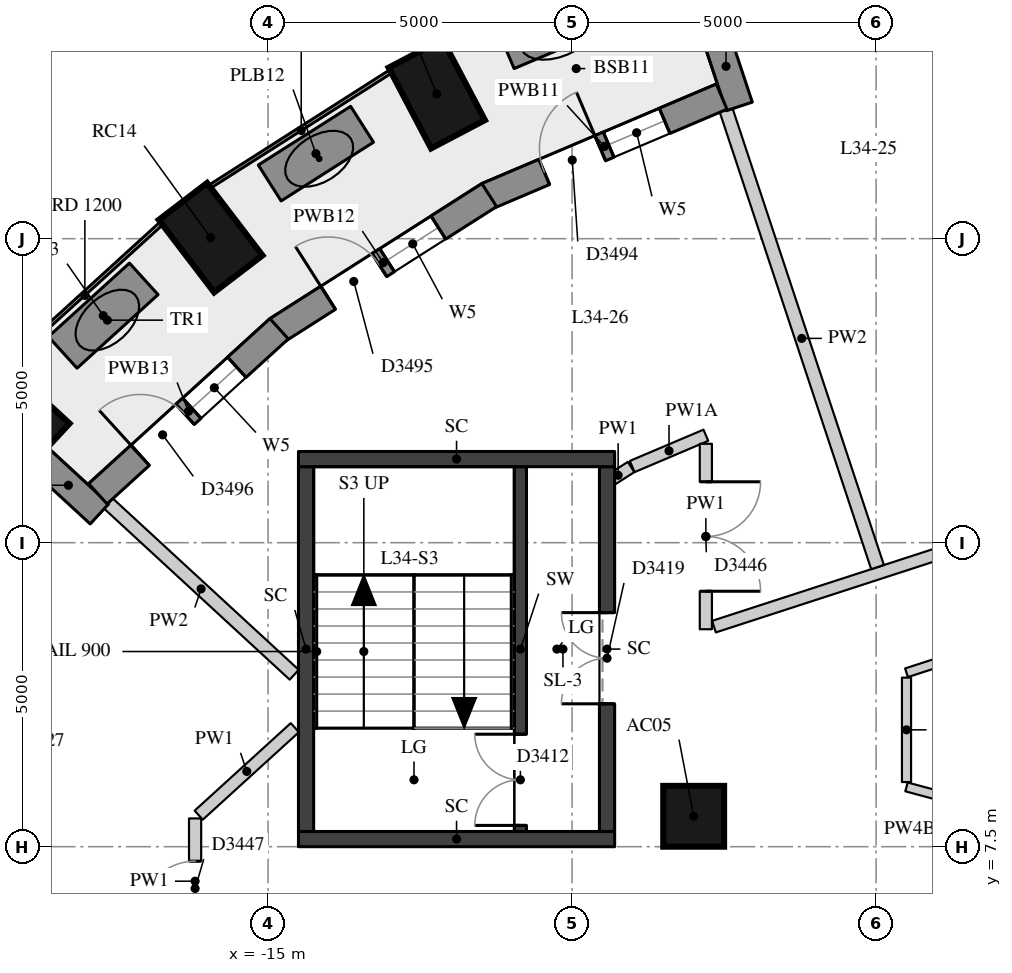
"""IFC4 building model, lengths in metres.
Left out: names, types, materials, properties, quantities, classifications, styles, units other than length and angle.
Written with IfcOpenShell. Run it as: python <this file> out.ifc"""

import sys

from ifc_helpers import new_model, si_unit, direction, frame, frame_2d, origin, origin_2d, place, context, subcontext, project, spatial, rectangle, extrude, element, fill, save


model = new_model("IFC4")
c1 = context("Model", 3, precision=1e-05, world=origin(), true_north=direction((0.0, 1.0)))
c2 = subcontext(c1, "Body", "Model", "MODEL_VIEW")
j1 = project(units=[si_unit("LENGTHUNIT", "METRE"), si_unit("PLANEANGLEUNIT", "RADIAN")], contexts=[c1])
p1 = place(None, origin())
s1 = spatial("IfcSite", under=j1, at=p1, CompositionType="ELEMENT")
p2 = place(p1, origin())
s2 = spatial("IfcBuilding", under=s1, at=p2, CompositionType="ELEMENT")
p3 = place(p2, frame((0.0, 0.0, 121.9)))
s3 = spatial("IfcBuildingStorey", under=s2, at=p3, CompositionType="ELEMENT", Elevation=121.9)
for number, where, z_axis, x_axis in (
    (1, (-12.225, 19.882, 0.0), (0.0, 0.0, 1.0), (-0.465, 0.885, 0.0)),
    (2, (-15.945, 17.517, 0.0), (0.0, 0.0, 1.0), (-0.607, 0.795, 0.0)),
    (3, (-19.156, 14.602, 0.0), (0.0, 0.0, 1.0), (-0.735, 0.678, 0.0)),
):
    element("IfcColumn", number, at=place(p3, frame(where, z_axis=z_axis, x_axis=x_axis)), inside=s3, PredefinedType="COLUMN", context=c2, shape_type="SweptSolid", body=[
        extrude(rectangle(XDim=1.5, YDim=1.0, at=origin_2d()), origin(), (0.0, 0.0, 1.0), 3.3),
    ])
p4 = place(p3, frame((-8.0, 8.0, 0.0), z_axis=(0.0, 0.0, 1.0), x_axis=(1.0, 0.0, 0.0)))
e4 = element("IfcColumn", 4, at=p4, inside=s3, PredefinedType="COLUMN", context=c2, shape_type="SweptSolid", body=[
    extrude(rectangle(XDim=1.0, YDim=1.0, at=origin_2d()), origin(), (0.0, 0.0, 1.0), 3.3),
])
p5 = place(p3, frame((-7.687, 20.995, 0.0), z_axis=(0.0, 0.0, 1.0), x_axis=(0.314541283205, -0.949243794375, 0.0)))
e5 = element("IfcWall", 5, at=p5, inside=s3, PredefinedType="SOLIDWALL", context=c2, shape_type="SweptSolid", body=[
    extrude(rectangle(XDim=1.39, YDim=0.45, at=frame_2d((0.695, 0.0))), origin(), (0.0, 0.0, 1.0), 3.02),
])
p6 = place(p3, frame((-18.795, 13.916, 0.0), z_axis=(0.0, 0.0, 1.0), x_axis=(0.735395448697, -0.677638202905, 0.0)))
e6 = element("IfcWall", 6, at=p6, inside=s3, PredefinedType="SOLIDWALL", context=c2, shape_type="SweptSolid", body=[
    extrude(rectangle(XDim=1.391, YDim=0.45, at=frame_2d((0.695, 0.0))), origin(), (0.0, 0.0, 1.0), 3.02),
])
p7 = place(p3, frame((-7.54, 19.836, 0.0), z_axis=(0.0, 0.0, 1.0), x_axis=(-0.920502375708, -0.390736965637, 0.0)))
e7 = element("IfcWall", 7, at=p7, inside=s3, PredefinedType="SOLIDWALL", context=c2, shape_type="SweptSolid", body=[
    extrude(rectangle(XDim=4.188, YDim=0.45, at=frame_2d((2.094, 0.0))), origin(), (0.0, 0.0, 1.0), 3.02),
])
p8 = place(p7, frame((1.019, 0.0, 0.4)))
e8 = element("IfcOpeningElement", 8, at=p8, cuts=e7, PredefinedType="OPENING", context=c2, shape_type="SweptSolid", body=[
    extrude(rectangle(XDim=1.0, YDim=1.75, at=frame_2d((0.5, 0.875))), frame((0.0, 0.235, 0.0), z_axis=(0.0, -1.0, 0.0), x_axis=(1.0, 0.0, 0.0)), (0.0, 0.0, 1.0), 0.47),
])
p9 = place(p7, frame((2.169, 0.0, 0.0)))
e9 = element("IfcOpeningElement", 9, at=p9, cuts=e7, PredefinedType="OPENING", context=c2, shape_type="SweptSolid", body=[
    extrude(rectangle(XDim=1.0, YDim=2.15, at=frame_2d((0.5, 1.075))), frame((0.0, 0.235, 0.0), z_axis=(0.0, -1.0, 0.0), x_axis=(1.0, 0.0, 0.0)), (0.0, 0.0, 1.0), 0.47),
])
p10 = place(p3, frame((-11.362, 18.217, 0.0), z_axis=(0.0, 0.0, 1.0), x_axis=(-0.843284405788, -0.537467590609, 0.0)))
e10 = element("IfcWall", 10, at=p10, inside=s3, PredefinedType="SOLIDWALL", context=c2, shape_type="SweptSolid", body=[
    extrude(rectangle(XDim=4.135, YDim=0.45, at=frame_2d((2.067, 0.0))), origin(), (0.0, 0.0, 1.0), 3.02),
])
p11 = place(p10, frame((0.992, 0.0, 0.4)))
e11 = element("IfcOpeningElement", 11, at=p11, cuts=e10, PredefinedType="OPENING", context=c2, shape_type="SweptSolid", body=[
    extrude(rectangle(XDim=1.0, YDim=1.75, at=frame_2d((0.5, 0.875))), frame((0.0, 0.235, 0.0), z_axis=(0.0, -1.0, 0.0), x_axis=(1.0, 0.0, 0.0)), (0.0, 0.0, 1.0), 0.47),
])
p12 = place(p10, frame((2.142, 0.0, 0.0)))
e12 = element("IfcOpeningElement", 12, at=p12, cuts=e10, PredefinedType="OPENING", context=c2, shape_type="SweptSolid", body=[
    extrude(rectangle(XDim=1.0, YDim=2.15, at=frame_2d((0.5, 1.075))), frame((0.0, 0.235, 0.0), z_axis=(0.0, -1.0, 0.0), x_axis=(1.0, 0.0, 0.0)), (0.0, 0.0, 1.0), 0.47),
])
p13 = place(p3, frame((-14.818, 16.018, 0.0), z_axis=(0.0, 0.0, 1.0), x_axis=(-0.739460283824, -0.673200184675, 0.0)))
e13 = element("IfcWall", 13, at=p13, inside=s3, PredefinedType="SOLIDWALL", context=c2, shape_type="SweptSolid", body=[
    extrude(rectangle(XDim=4.031, YDim=0.45, at=frame_2d((2.016, 0.0))), origin(), (0.0, 0.0, 1.0), 3.02),
])
p14 = place(p13, frame((0.94, 0.0, 0.4)))
e14 = element("IfcOpeningElement", 14, at=p14, cuts=e13, PredefinedType="OPENING", context=c2, shape_type="SweptSolid", body=[
    extrude(rectangle(XDim=1.0, YDim=1.75, at=frame_2d((0.5, 0.875))), frame((0.0, 0.235, 0.0), z_axis=(0.0, -1.0, 0.0), x_axis=(1.0, 0.0, 0.0)), (0.0, 0.0, 1.0), 0.47),
])
p15 = place(p13, frame((2.091, 0.0, 0.0)))
e15 = element("IfcOpeningElement", 15, at=p15, cuts=e13, PredefinedType="OPENING", context=c2, shape_type="SweptSolid", body=[
    extrude(rectangle(XDim=1.0, YDim=2.15, at=frame_2d((0.5, 1.075))), frame((0.0, 0.235, 0.0), z_axis=(0.0, -1.0, 0.0), x_axis=(1.0, 0.0, 0.0)), (0.0, 0.0, 1.0), 0.47),
])
for number, where, z_axis, x_axis in (
    (16, (-9.432, 21.322, 0.0), (0.0, 0.0, 1.0), (-0.921, -0.39, 0.0)),
    (17, (-13.454, 19.382, 0.0), (0.0, 0.0, 1.0), (-0.844, -0.537, 0.0)),
):
    element("IfcWall", number, at=place(p3, frame(where, z_axis=z_axis, x_axis=x_axis)), inside=s3, PredefinedType="USERDEFINED", context=c2, shape_type="SweptSolid", body=[
        extrude(rectangle(XDim=1.8, YDim=0.7, at=frame_2d((0.9, 0.0))), origin(), (0.0, 0.0, 1.0), 0.75),
    ])
p16 = place(p3, frame((-17.044, 16.839, 0.0), z_axis=(0.0, 0.0, 1.0), x_axis=(-0.740332755969, -0.6722405897, 0.0)))
e18 = element("IfcWall", 18, at=p16, inside=s3, PredefinedType="USERDEFINED", context=c2, shape_type="SweptSolid", body=[
    extrude(rectangle(XDim=1.8, YDim=0.7, at=frame_2d((0.9, 0.0))), origin(), (0.0, 0.0, 1.0), 0.75),
])
p17 = place(p3, frame((-10.85, 7.75, 0.0), z_axis=(0.0, 0.0, 1.0), x_axis=(0.0, 1.0, 0.0)))
e19 = element("IfcWall", 19, at=p17, inside=s3, PredefinedType="SHEAR", context=c2, shape_type="SweptSolid", body=[
    extrude(rectangle(XDim=6.0, YDim=0.2, at=frame_2d((3.0, 0.0))), origin(), (0.0, 0.0, 1.0), 3.02),
])
p18 = place(p17, frame((0.1, 0.0, 0.0)))
e20 = element("IfcOpeningElement", 20, at=p18, cuts=e19, PredefinedType="OPENING", context=c2, shape_type="SweptSolid", body=[
    extrude(rectangle(XDim=1.5, YDim=2.1, at=frame_2d((0.75, 1.05))), frame((0.0, 0.11, 0.0), z_axis=(0.0, -1.0, 0.0), x_axis=(1.0, 0.0, 0.0)), (0.0, 0.0, 1.0), 0.22),
])
p19 = place(p3, frame((-14.375, 7.75, -0.28), z_axis=(0.0, 0.0, 1.0), x_axis=(0.0, 1.0, 0.0)))
e21 = element("IfcWall", 21, at=p19, inside=s3, PredefinedType="SHEAR", context=c2, shape_type="SweptSolid", body=[
    extrude(rectangle(XDim=6.0, YDim=0.25, at=frame_2d((3.0, 0.0))), origin(), (0.0, 0.0, 1.0), 3.3),
])
p20 = place(p3, frame((-9.425, 7.75, -0.28), z_axis=(0.0, 0.0, 1.0), x_axis=(0.0, 1.0, 0.0)))
e22 = element("IfcWall", 22, at=p20, inside=s3, PredefinedType="SHEAR", context=c2, shape_type="SweptSolid", body=[
    extrude(rectangle(XDim=6.0, YDim=0.25, at=frame_2d((3.0, 0.0))), origin(), (0.0, 0.0, 1.0), 3.3),
])
p21 = place(p20, frame((2.1, 0.0, 0.28)))
e23 = element("IfcOpeningElement", 23, at=p21, cuts=e22, PredefinedType="OPENING", context=c2, shape_type="SweptSolid", body=[
    extrude(rectangle(XDim=1.5, YDim=2.1, at=frame_2d((0.75, 1.05))), frame((0.0, 0.135, 0.0), z_axis=(0.0, -1.0, 0.0), x_axis=(1.0, 0.0, 0.0)), (0.0, 0.0, 1.0), 0.27),
])
for number, where, z_axis, x_axis in (
    (24, (-14.5, 13.875, -0.28), (0.0, 0.0, 1.0), (1.0, 0.0, 0.0)),
    (25, (-14.5, 7.625, -0.28), (0.0, 0.0, 1.0), (1.0, 0.0, 0.0)),
):
    element("IfcWall", number, at=place(p3, frame(where, z_axis=z_axis, x_axis=x_axis)), inside=s3, PredefinedType="SHEAR", context=c2, shape_type="SweptSolid", body=[
        extrude(rectangle(XDim=5.2, YDim=0.25, at=frame_2d((2.6, 0.0))), origin(), (0.0, 0.0, 1.0), 3.3),
    ])
p22 = place(p3, frame((-16.2, 5.9, 0.0), z_axis=(0.0, 0.0, 1.0), x_axis=(0.0, 1.0, 0.0)))
e26 = element("IfcWall", 26, at=p22, inside=s3, PredefinedType="PARTITIONING", context=c2, shape_type="SweptSolid", body=[
    extrude(rectangle(XDim=2.065, YDim=0.2, at=frame_2d((1.032, 0.0))), origin(), (0.0, 0.0, 1.0), 3.02),
])
p23 = place(p22, frame((0.462, 0.0, 0.0)))
e27 = element("IfcOpeningElement", 27, at=p23, cuts=e26, PredefinedType="OPENING", context=c2, shape_type="SweptSolid", body=[
    extrude(rectangle(XDim=0.9, YDim=2.1, at=frame_2d((0.45, 1.05))), frame((0.0, 0.11, 0.0), z_axis=(0.0, -1.0, 0.0), x_axis=(1.0, 0.0, 0.0)), (0.0, 0.0, 1.0), 0.22),
])
p24 = place(p3, frame((-16.14, 8.019, 0.0), z_axis=(0.0, 0.0, 1.0), x_axis=(0.739392120684, 0.673275049197, 0.0)))
e28 = element("IfcWall", 28, at=p24, inside=s3, PredefinedType="PARTITIONING", context=c2, shape_type="SweptSolid", body=[
    extrude(rectangle(XDim=2.138, YDim=0.2, at=frame_2d((1.069, 0.0))), origin(), (0.0, 0.0, 1.0), 3.02),
])
p25 = place(p3, frame((-9.455, 13.474, 0.0), z_axis=(0.0, 0.0, 1.0), x_axis=(0.843342387181, 0.537376607216, 0.0)))
e29 = element("IfcWall", 29, at=p25, inside=s3, PredefinedType="PARTITIONING", context=c2, shape_type="SweptSolid", body=[
    extrude(rectangle(XDim=0.504, YDim=0.2, at=frame_2d((0.252, 0.0))), origin(), (0.0, 0.0, 1.0), 3.02),
])
p26 = place(p3, frame((-9.011, 13.752, 0.0), z_axis=(0.0, 0.0, 1.0), x_axis=(0.920454408747, 0.390849947446, 0.0)))
e30 = element("IfcWall", 30, at=p26, inside=s3, PredefinedType="PARTITIONING", context=c2, shape_type="SweptSolid", body=[
    extrude(rectangle(XDim=1.316, YDim=0.2, at=frame_2d((0.658, 0.0))), origin(), (0.0, 0.0, 1.0), 2.57),
])
p27 = place(p3, frame((-7.8, 14.127, 0.0), z_axis=(0.0, 0.0, 1.0), x_axis=(0.0, -1.0, 0.0)))
e31 = element("IfcWall", 31, at=p27, inside=s3, PredefinedType="PARTITIONING", context=c2, shape_type="SweptSolid", body=[
    extrude(rectangle(XDim=3.05, YDim=0.2, at=frame_2d((1.525, 0.0))), origin(), (0.0, 0.0, 1.0), 3.02),
])
p28 = place(p27, frame((0.625, 0.0, 0.0)))
e32 = element("IfcOpeningElement", 32, at=p28, cuts=e31, PredefinedType="OPENING", context=c2, shape_type="SweptSolid", body=[
    extrude(rectangle(XDim=1.8, YDim=2.1, at=frame_2d((0.9, 1.05))), frame((0.0, 0.11, 0.0), z_axis=(0.0, -1.0, 0.0), x_axis=(1.0, 0.0, 0.0)), (0.0, 0.0, 1.0), 0.22),
])
p29 = place(p3, frame((-7.667, 11.119, 0.0), z_axis=(0.0, 0.0, 1.0), x_axis=(0.951088334028, 0.308919052304, 0.0)))
e33 = element("IfcWall", 33, at=p29, inside=s3, PredefinedType="PARTITIONING", context=c2, shape_type="SweptSolid", body=[
    extrude(rectangle(XDim=12.362, YDim=0.2, at=frame_2d((6.181, 0.0))), origin(), (0.0, 0.0, 1.0), 3.02),
])
p30 = place(p29, frame((7.686, 0.0, 0.0)))
e34 = element("IfcOpeningElement", 34, at=p30, cuts=e33, PredefinedType="OPENING", context=c2, shape_type="SweptSolid", body=[
    extrude(rectangle(XDim=1.1, YDim=2.1, at=frame_2d((0.55, 1.05))), frame((0.0, 0.11, 0.0), z_axis=(0.0, -1.0, 0.0), x_axis=(1.0, 0.0, 0.0)), (0.0, 0.0, 1.0), 0.22),
])
p31 = place(p29, frame((3.88, 0.0, 0.0)))
e35 = element("IfcOpeningElement", 35, at=p31, cuts=e33, PredefinedType="OPENING", context=c2, shape_type="SweptSolid", body=[
    extrude(rectangle(XDim=0.9, YDim=2.1, at=frame_2d((0.45, 1.05))), frame((0.0, 0.11, 0.0), z_axis=(0.0, -1.0, 0.0), x_axis=(1.0, 0.0, 0.0)), (0.0, 0.0, 1.0), 0.22),
])
p32 = place(p3, frame((-4.5, 10.361, 0.0), z_axis=(0.0, 0.0, 1.0), x_axis=(0.951090931116, 0.308911056372, 0.0)))
e36 = element("IfcWall", 36, at=p32, inside=s3, PredefinedType="PARTITIONING", context=c2, shape_type="SweptSolid", body=[
    extrude(rectangle(XDim=5.362, YDim=0.15, at=frame_2d((2.681, 0.0))), origin(), (0.0, 0.0, 1.0), 3.02),
])
p33 = place(p32, frame((2.231, 0.0, 0.0)))
e37 = element("IfcOpeningElement", 37, at=p33, cuts=e36, PredefinedType="OPENING", context=c2, shape_type="SweptSolid", body=[
    extrude(rectangle(XDim=0.9, YDim=2.1, at=frame_2d((0.45, 1.05))), frame((0.0, 0.085, 0.0), z_axis=(0.0, -1.0, 0.0), x_axis=(1.0, 0.0, 0.0)), (0.0, 0.0, 1.0), 0.17),
])
p34 = place(p3, frame((-3.328, 8.169, 0.0), z_axis=(0.0, 0.0, 1.0), x_axis=(-0.965933680277, 0.258789731841, 0.0)))
e38 = element("IfcWall", 38, at=p34, inside=s3, PredefinedType="PARTITIONING", context=c2, shape_type="SweptSolid", body=[
    extrude(rectangle(XDim=1.213, YDim=0.15, at=frame_2d((0.606, 0.0))), origin(), (0.0, 0.0, 1.0), 2.47),
])
p35 = place(p3, frame((-4.5, 8.563, 0.0), z_axis=(0.0, 0.0, 1.0), x_axis=(0.0, 1.0, 0.0)))
e39 = element("IfcWall", 39, at=p35, inside=s3, PredefinedType="PARTITIONING", context=c2, shape_type="SweptSolid", body=[
    extrude(rectangle(XDim=1.717, YDim=0.15, at=frame_2d((0.859, 0.0))), origin(), (0.0, 0.0, 1.0), 3.02),
])
p36 = place(p3, frame((-7.469, 19.622, 0.0), z_axis=(0.0, 0.0, 1.0), x_axis=(0.314545340174, -0.949242450049, 0.0)))
e40 = element("IfcWall", 40, at=p36, inside=s3, PredefinedType="PARTITIONING", context=c2, shape_type="SweptSolid", body=[
    extrude(rectangle(XDim=7.926, YDim=0.22, at=frame_2d((3.963, 0.0))), origin(), (0.0, 0.0, 1.0), 3.02),
])
p37 = place(p3, frame((-17.633, 13.151, 0.0), z_axis=(0.0, 0.0, 1.0), x_axis=(0.73535370522, -0.677683501511, 0.0)))
e41 = element("IfcWall", 41, at=p37, inside=s3, PredefinedType="PARTITIONING", context=c2, shape_type="SweptSolid", body=[
    extrude(rectangle(XDim=4.166, YDim=0.22, at=frame_2d((2.083, 0.0))), origin(), (0.0, 0.0, 1.0), 3.02),
])
p38 = place(p3, frame((-22.983, 7.21, 0.0), z_axis=(0.0, 0.0, 1.0), x_axis=(0.928548801607, -0.371210348771, 0.0)))
e42 = element("IfcWall", 42, at=p38, inside=s3, PredefinedType="PARTITIONING", context=c2, shape_type="SweptSolid", body=[
    extrude(rectangle(XDim=7.003, YDim=0.22, at=frame_2d((3.501, 0.0))), origin(), (0.0, 0.0, 1.0), 3.02),
])
p39 = place(p8, origin())
e43 = element("IfcWindow", 43, at=p39, inside=s3, PartitioningType="SINGLE_PANEL", PredefinedType="WINDOW", context=c2, shape_type="SweptSolid", body=[
    extrude(rectangle(XDim=1.0, YDim=1.75, at=frame_2d((0.5, 0.875))), frame((0.0, 0.035, 0.0), z_axis=(0.0, -1.0, 0.0), x_axis=(1.0, 0.0, 0.0)), (0.0, 0.0, 1.0), 0.06),
])
fill(e8, e43)
p40 = place(p9, frame((1.0, 0.0, 0.0), z_axis=(0.0, 0.0, 1.0), x_axis=(-1.0, 0.0, 0.0)))
e44 = element("IfcDoor", 44, at=p40, inside=s3, OperationType="SINGLE_SWING_RIGHT", PredefinedType="DOOR", context=c2, shape_type="SweptSolid", body=[
    extrude(rectangle(XDim=1.0, YDim=2.15, at=frame_2d((0.5, 1.075))), frame((0.0, 0.075, 0.0), z_axis=(0.0, -1.0, 0.0), x_axis=(1.0, 0.0, 0.0)), (0.0, 0.0, 1.0), 0.05),
])
fill(e9, e44)
p41 = place(p11, origin())
e45 = element("IfcWindow", 45, at=p41, inside=s3, PartitioningType="SINGLE_PANEL", PredefinedType="WINDOW", context=c2, shape_type="SweptSolid", body=[
    extrude(rectangle(XDim=1.0, YDim=1.75, at=frame_2d((0.5, 0.875))), frame((0.0, 0.035, 0.0), z_axis=(0.0, -1.0, 0.0), x_axis=(1.0, 0.0, 0.0)), (0.0, 0.0, 1.0), 0.06),
])
fill(e11, e45)
p42 = place(p12, frame((1.0, 0.0, 0.0), z_axis=(0.0, 0.0, 1.0), x_axis=(-1.0, 0.0, 0.0)))
e46 = element("IfcDoor", 46, at=p42, inside=s3, OperationType="SINGLE_SWING_LEFT", PredefinedType="DOOR", context=c2, shape_type="SweptSolid", body=[
    extrude(rectangle(XDim=1.0, YDim=2.15, at=frame_2d((0.5, 1.075))), frame((0.0, 0.075, 0.0), z_axis=(0.0, -1.0, 0.0), x_axis=(1.0, 0.0, 0.0)), (0.0, 0.0, 1.0), 0.05),
])
fill(e12, e46)
p43 = place(p14, origin())
e47 = element("IfcWindow", 47, at=p43, inside=s3, PartitioningType="SINGLE_PANEL", PredefinedType="WINDOW", context=c2, shape_type="SweptSolid", body=[
    extrude(rectangle(XDim=1.0, YDim=1.75, at=frame_2d((0.5, 0.875))), frame((0.0, 0.035, 0.0), z_axis=(0.0, -1.0, 0.0), x_axis=(1.0, 0.0, 0.0)), (0.0, 0.0, 1.0), 0.06),
])
fill(e14, e47)
p44 = place(p15, frame((1.0, 0.0, 0.0), z_axis=(0.0, 0.0, 1.0), x_axis=(-1.0, 0.0, 0.0)))
e48 = element("IfcDoor", 48, at=p44, inside=s3, OperationType="SINGLE_SWING_LEFT", PredefinedType="DOOR", context=c2, shape_type="SweptSolid", body=[
    extrude(rectangle(XDim=1.0, YDim=2.15, at=frame_2d((0.5, 1.075))), frame((0.0, 0.075, 0.0), z_axis=(0.0, -1.0, 0.0), x_axis=(1.0, 0.0, 0.0)), (0.0, 0.0, 1.0), 0.05),
])
fill(e15, e48)
p45 = place(p18, origin())
e49 = element("IfcDoor", 49, at=p45, inside=s3, OperationType="DOUBLE_DOOR_SINGLE_SWING", PredefinedType="DOOR", context=c2, shape_type="SweptSolid", body=[
    extrude(rectangle(XDim=1.5, YDim=2.1, at=frame_2d((0.75, 1.05))), frame((0.0, 0.025, 0.0), z_axis=(0.0, -1.0, 0.0), x_axis=(1.0, 0.0, 0.0)), (0.0, 0.0, 1.0), 0.05),
])
fill(e20, e49)
p46 = place(p21, origin())
e50 = element("IfcDoor", 50, at=p46, inside=s3, OperationType="DOUBLE_DOOR_SINGLE_SWING", PredefinedType="DOOR", context=c2, shape_type="SweptSolid", body=[
    extrude(rectangle(XDim=1.5, YDim=2.1, at=frame_2d((0.75, 1.05))), frame((0.0, 0.025, 0.0), z_axis=(0.0, -1.0, 0.0), x_axis=(1.0, 0.0, 0.0)), (0.0, 0.0, 1.0), 0.05),
])
fill(e23, e50)
p47 = place(p28, origin())
e51 = element("IfcDoor", 51, at=p47, inside=s3, OperationType="DOUBLE_DOOR_SINGLE_SWING", PredefinedType="DOOR", context=c2, shape_type="SweptSolid", body=[
    extrude(rectangle(XDim=1.8, YDim=2.1, at=frame_2d((0.9, 1.05))), frame((0.0, 0.025, 0.0), z_axis=(0.0, -1.0, 0.0), x_axis=(1.0, 0.0, 0.0)), (0.0, 0.0, 1.0), 0.05),
])
fill(e32, e51)
p48 = place(p23, origin())
e52 = element("IfcDoor", 52, at=p48, inside=s3, OperationType="SINGLE_SWING_LEFT", PredefinedType="DOOR", context=c2, shape_type="SweptSolid", body=[
    extrude(rectangle(XDim=0.9, YDim=2.1, at=frame_2d((0.45, 1.05))), frame((0.0, 0.025, 0.0), z_axis=(0.0, -1.0, 0.0), x_axis=(1.0, 0.0, 0.0)), (0.0, 0.0, 1.0), 0.05),
])
fill(e27, e52)
save(model, sys.argv[1])
